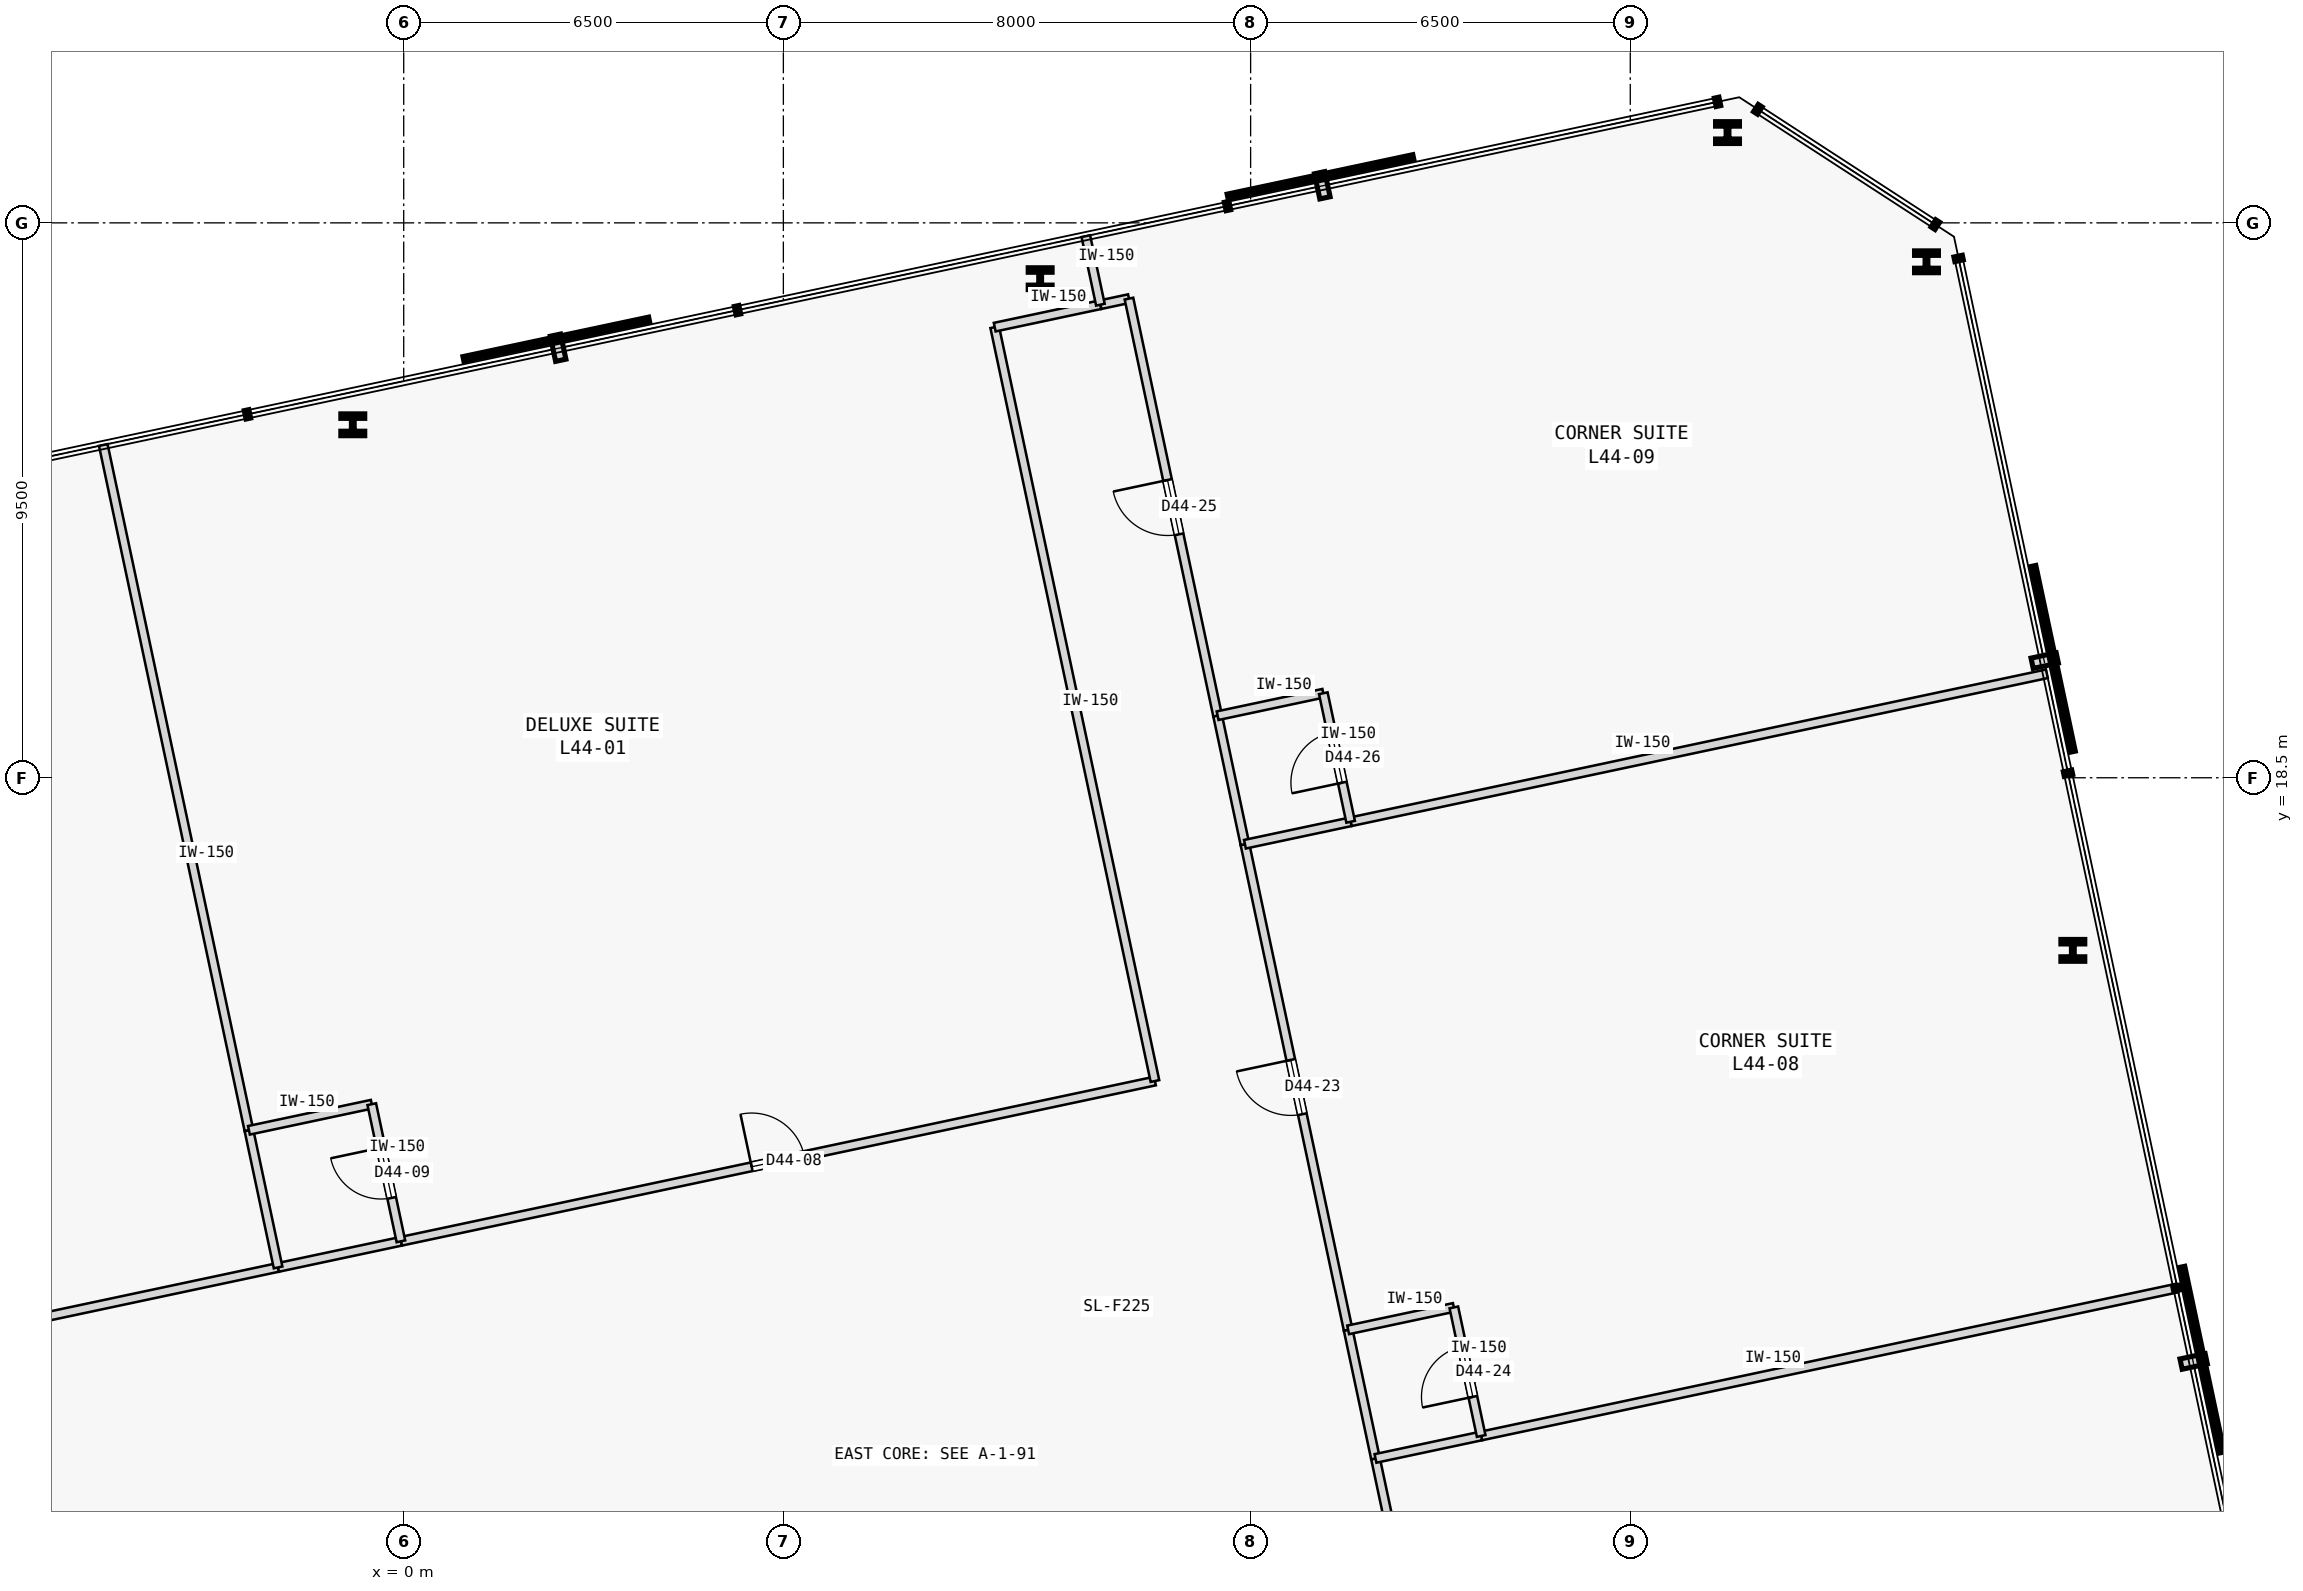
"""IFC4 building model, lengths in metres.
Left out: names, types, materials, properties, quantities, classifications, styles, units other than length and angle.
Written with IfcOpenShell. Run it as: python <this file> out.ifc"""

import sys

from ifc_helpers import new_model, si_unit, direction, frame, frame_2d, origin, origin_2d, place, context, subcontext, project, spatial, rectangle, i_section, extrude, element, fill, save


model = new_model("IFC4")
c1 = context("Model", 3, precision=1e-05, world=origin(), true_north=direction((0.0, 1.0)))
c2 = subcontext(c1, "Body", "Model", "MODEL_VIEW")
j1 = project(units=[si_unit("LENGTHUNIT", "METRE"), si_unit("PLANEANGLEUNIT", "RADIAN")], contexts=[c1])
p1 = place(None, origin())
s1 = spatial("IfcSite", under=j1, at=p1, CompositionType="ELEMENT")
p2 = place(p1, origin())
s2 = spatial("IfcBuilding", under=s1, at=p2, CompositionType="ELEMENT")
p3 = place(p2, frame((0.0, 0.0, 171.8)))
s3 = spatial("IfcBuildingStorey", under=s2, at=p3, CompositionType="ELEMENT", Elevation=171.8)
for number, where, z_axis, x_axis in (
    (1, (28.577, 15.545, 0.0), (0.0, 0.0, 1.0), (1.0, 0.0, 0.0)),
    (2, (26.071, 27.333, 0.0), (0.0, 0.0, 1.0), (1.0, 0.0, 0.0)),
    (3, (22.665, 29.546, 0.0), (0.0, 0.0, 1.0), (1.0, 0.0, 0.0)),
    (4, (10.896, 27.044, 0.0), (0.0, 0.0, 1.0), (1.0, 0.0, 0.0)),
    (5, (-0.872, 24.543, 0.0), (0.0, 0.0, 1.0), (1.0, 0.0, 0.0)),
):
    element("IfcColumn", number, at=place(p3, frame(where, z_axis=z_axis, x_axis=x_axis)), inside=s3, PredefinedType="COLUMN", context=c2, shape_type="SweptSolid", body=[
        extrude(i_section(OverallWidth=0.409, OverallDepth=0.374, WebThickness=0.048, FlangeThickness=0.077, FilletRadius=0.015, at=origin_2d()), origin(), (0.0, 0.0, 1.0), 3.4),
    ])
p4 = place(p3, frame((-17.162, 6.926, 0.0), z_axis=(0.0, 0.0, 1.0), x_axis=(0.978145870853, 0.207919829103, 0.0)))
e6 = element("IfcWall", 6, at=p4, inside=s3, PredefinedType="PARTITIONING", context=c2, shape_type="SweptSolid", body=[
    extrude(rectangle(XDim=15.347, YDim=0.15, at=frame_2d((7.673, 0.0))), origin(), (0.0, 0.0, 1.0), 3.175),
])
p5 = place(p4, frame((7.213, 0.0, 0.0)))
e7 = element("IfcOpeningElement", 7, at=p5, cuts=e6, PredefinedType="OPENING", context=c2, shape_type="SweptSolid", body=[
    extrude(rectangle(XDim=0.92, YDim=2.15, at=frame_2d((0.46, 1.075))), frame((0.0, 0.085, 0.0), z_axis=(0.0, -1.0, 0.0), x_axis=(1.0, 0.0, 0.0)), (0.0, 0.0, 1.0), 0.17),
])
p6 = place(p3, frame((-0.048, 10.564, 0.0), z_axis=(0.0, 0.0, 1.0), x_axis=(0.978149729453, 0.207901675731, 0.0)))
e8 = element("IfcWall", 8, at=p6, inside=s3, PredefinedType="PARTITIONING", context=c2, shape_type="SweptSolid", body=[
    extrude(rectangle(XDim=13.198, YDim=0.15, at=frame_2d((6.599, 0.0))), origin(), (0.0, 0.0, 1.0), 3.175),
])
p7 = place(p6, frame((6.139, 0.0, 0.0)))
e9 = element("IfcOpeningElement", 9, at=p7, cuts=e8, PredefinedType="OPENING", context=c2, shape_type="SweptSolid", body=[
    extrude(rectangle(XDim=0.92, YDim=2.15, at=frame_2d((0.46, 1.075))), frame((0.0, 0.085, 0.0), z_axis=(0.0, -1.0, 0.0), x_axis=(1.0, 0.0, 0.0)), (0.0, 0.0, 1.0), 0.17),
])
p8 = place(p3, frame((12.862, 13.308, 0.0), z_axis=(0.0, 0.0, 1.0), x_axis=(-0.207911421929, 0.978147657888, 0.0)))
e10 = element("IfcWall", 10, at=p8, inside=s3, PredefinedType="PARTITIONING", context=c2, shape_type="SweptSolid", body=[
    extrude(rectangle(XDim=13.195, YDim=0.15, at=frame_2d((6.598, 0.0))), origin(), (0.0, 0.0, 1.0), 3.175),
])
p9 = place(p3, frame((10.118, 26.214, 0.0), z_axis=(0.0, 0.0, 1.0), x_axis=(0.978133353907, 0.20797870558, 0.0)))
e11 = element("IfcWall", 11, at=p9, inside=s3, PredefinedType="PARTITIONING", context=c2, shape_type="SweptSolid", body=[
    extrude(rectangle(XDim=1.85, YDim=0.15, at=frame_2d((0.925, 0.0))), origin(), (0.0, 0.0, 1.0), 3.175),
])
p10 = place(p3, frame((-2.151, 10.117, 0.0), z_axis=(0.0, 0.0, 1.0), x_axis=(0.978146728319, 0.207915795165, 0.0)))
e12 = element("IfcWall", 12, at=p10, inside=s3, PredefinedType="PARTITIONING", context=c2, shape_type="SweptSolid", body=[
    extrude(rectangle(XDim=2.15, YDim=0.15, at=frame_2d((1.075, 0.0))), origin(), (0.0, 0.0, 1.0), 3.175),
])
p11 = place(p3, frame((18.405, -1.468, 0.0), z_axis=(0.0, 0.0, 1.0), x_axis=(-0.207888984761, 0.97815242678, 0.0)))
e13 = element("IfcWall", 13, at=p11, inside=s3, PredefinedType="PARTITIONING", context=c2, shape_type="SweptSolid", body=[
    extrude(rectangle(XDim=8.5, YDim=0.15, at=frame_2d((4.25, 0.0))), origin(), (0.0, 0.0, 1.0), 3.175),
])
p12 = place(p11, frame((3.775, 0.0, 0.0)))
e14 = element("IfcOpeningElement", 14, at=p12, cuts=e13, PredefinedType="OPENING", context=c2, shape_type="SweptSolid", body=[
    extrude(rectangle(XDim=0.95, YDim=2.15, at=frame_2d((0.475, 1.075))), frame((0.0, 0.085, 0.0), z_axis=(0.0, -1.0, 0.0), x_axis=(1.0, 0.0, 0.0)), (0.0, 0.0, 1.0), 0.17),
])
p13 = place(p3, frame((16.17, 9.047, 0.0), z_axis=(0.0, 0.0, 1.0), x_axis=(-0.2079164651, 0.978146585917, 0.0)))
e15 = element("IfcWall", 15, at=p13, inside=s3, PredefinedType="PARTITIONING", context=c2, shape_type="SweptSolid", body=[
    extrude(rectangle(XDim=8.5, YDim=0.15, at=frame_2d((4.25, 0.0))), origin(), (0.0, 0.0, 1.0), 3.175),
])
p14 = place(p13, frame((3.775, 0.0, 0.0)))
e16 = element("IfcOpeningElement", 16, at=p14, cuts=e15, PredefinedType="OPENING", context=c2, shape_type="SweptSolid", body=[
    extrude(rectangle(XDim=0.95, YDim=2.15, at=frame_2d((0.475, 1.075))), frame((0.0, 0.085, 0.0), z_axis=(0.0, -1.0, 0.0), x_axis=(1.0, 0.0, 0.0)), (0.0, 0.0, 1.0), 0.17),
])
p15 = place(p3, frame((16.638, 6.847, 0.0), z_axis=(0.0, 0.0, 1.0), x_axis=(-0.207913264065, 0.978147266328, 0.0)))
e17 = element("IfcWall", 17, at=p15, inside=s3, PredefinedType="PARTITIONING", context=c2, shape_type="SweptSolid", body=[
    extrude(rectangle(XDim=2.25, YDim=0.15, at=frame_2d((1.125, 0.0))), origin(), (0.0, 0.0, 1.0), 3.175),
])
p16 = place(p3, frame((11.928, 26.599, 0.0), z_axis=(0.0, 0.0, 1.0), x_axis=(0.97822210712, 0.207560856478, 0.0)))
e18 = element("IfcWall", 18, at=p16, inside=s3, PredefinedType="PARTITIONING", context=c2, shape_type="SweptSolid", body=[
    extrude(rectangle(XDim=0.5, YDim=0.15, at=frame_2d((0.25, 0.0))), origin(), (0.0, 0.0, 1.0), 3.175),
])
p17 = place(p3, frame((13.935, 19.562, 0.0), z_axis=(0.0, 0.0, 1.0), x_axis=(-0.207923154003, 0.978145164088, 0.0)))
e19 = element("IfcWall", 19, at=p17, inside=s3, PredefinedType="PARTITIONING", context=c2, shape_type="SweptSolid", body=[
    extrude(rectangle(XDim=7.3, YDim=0.15, at=frame_2d((3.65, 0.0))), origin(), (0.0, 0.0, 1.0), 3.175),
])
p18 = place(p17, frame((3.175, 0.0, 0.0)))
e20 = element("IfcOpeningElement", 20, at=p18, cuts=e19, PredefinedType="OPENING", context=c2, shape_type="SweptSolid", body=[
    extrude(rectangle(XDim=0.95, YDim=2.15, at=frame_2d((0.475, 1.075))), frame((0.0, 0.085, 0.0), z_axis=(0.0, -1.0, 0.0), x_axis=(1.0, 0.0, 0.0)), (0.0, 0.0, 1.0), 0.17),
])
p19 = place(p3, frame((14.403, 17.362, 0.0), z_axis=(0.0, 0.0, 1.0), x_axis=(-0.207913264065, 0.978147266328, 0.0)))
e21 = element("IfcWall", 21, at=p19, inside=s3, PredefinedType="PARTITIONING", context=c2, shape_type="SweptSolid", body=[
    extrude(rectangle(XDim=2.25, YDim=0.15, at=frame_2d((1.125, 0.0))), origin(), (0.0, 0.0, 1.0), 3.175),
])
p20 = place(p3, frame((-2.65, 12.464, 0.0), z_axis=(0.0, 0.0, 1.0), x_axis=(-0.207914988081, 0.978146899873, 0.0)))
e22 = element("IfcWall", 22, at=p20, inside=s3, PredefinedType="PARTITIONING", context=c2, shape_type="SweptSolid", body=[
    extrude(rectangle(XDim=11.995, YDim=0.15, at=frame_2d((5.998, 0.0))), origin(), (0.0, 0.0, 1.0), 3.175),
])
p21 = place(p3, frame((-2.151, 10.117, 0.0), z_axis=(0.0, 0.0, 1.0), x_axis=(-0.207917150959, 0.978146440129, 0.0)))
e23 = element("IfcWall", 23, at=p21, inside=s3, PredefinedType="PARTITIONING", context=c2, shape_type="SweptSolid", body=[
    extrude(rectangle(XDim=2.4, YDim=0.15, at=frame_2d((1.2, 0.0))), origin(), (0.0, 0.0, 1.0), 3.175),
])
p22 = place(p3, frame((-2.65, 12.464, 0.0), z_axis=(0.0, 0.0, 1.0), x_axis=(0.978146728319, 0.207915795165, 0.0)))
e24 = element("IfcWall", 24, at=p22, inside=s3, PredefinedType="PARTITIONING", context=c2, shape_type="SweptSolid", body=[
    extrude(rectangle(XDim=2.15, YDim=0.15, at=frame_2d((1.075, 0.0))), origin(), (0.0, 0.0, 1.0), 3.175),
])
p23 = place(p3, frame((-0.048, 10.564, 0.0), z_axis=(0.0, 0.0, 1.0), x_axis=(-0.207917150959, 0.978146440129, 0.0)))
e25 = element("IfcWall", 25, at=p23, inside=s3, PredefinedType="PARTITIONING", context=c2, shape_type="SweptSolid", body=[
    extrude(rectangle(XDim=2.4, YDim=0.15, at=frame_2d((1.2, 0.0))), origin(), (0.0, 0.0, 1.0), 3.175),
])
p24 = place(p23, frame((0.76, 0.0, 0.0)))
e26 = element("IfcOpeningElement", 26, at=p24, cuts=e25, PredefinedType="OPENING", context=c2, shape_type="SweptSolid", body=[
    extrude(rectangle(XDim=0.88, YDim=2.15, at=frame_2d((0.44, 1.075))), frame((0.0, 0.085, 0.0), z_axis=(0.0, -1.0, 0.0), x_axis=(1.0, 0.0, 0.0)), (0.0, 0.0, 1.0), 0.17),
])
p25 = place(p3, frame((11.928, 26.599, 0.0), z_axis=(0.0, 0.0, 1.0), x_axis=(-0.20795853359, 0.978137642823, 0.0)))
e27 = element("IfcWall", 27, at=p25, inside=s3, PredefinedType="PARTITIONING", context=c2, shape_type="SweptSolid", body=[
    extrude(rectangle(XDim=1.2, YDim=0.15, at=frame_2d((0.6, 0.0))), origin(), (0.0, 0.0, 1.0), 3.175),
])
p26 = place(p3, frame((18.447, 7.231, 0.0), z_axis=(0.0, 0.0, 1.0), x_axis=(0.978149634612, 0.207902121941, 0.0)))
e28 = element("IfcWall", 28, at=p26, inside=s3, PredefinedType="PARTITIONING", context=c2, shape_type="SweptSolid", body=[
    extrude(rectangle(XDim=12.187, YDim=0.15, at=frame_2d((6.094, 0.0))), origin(), (0.0, 0.0, 1.0), 3.175),
])
p27 = place(p3, frame((16.638, 6.847, 0.0), z_axis=(0.0, 0.0, 1.0), x_axis=(0.978160192495, 0.207852442415, 0.0)))
e29 = element("IfcWall", 29, at=p27, inside=s3, PredefinedType="PARTITIONING", context=c2, shape_type="SweptSolid", body=[
    extrude(rectangle(XDim=1.85, YDim=0.15, at=frame_2d((0.925, 0.0))), origin(), (0.0, 0.0, 1.0), 3.175),
])
p28 = place(p3, frame((16.17, 9.047, 0.0), z_axis=(0.0, 0.0, 1.0), x_axis=(0.978133353907, 0.20797870558, 0.0)))
e30 = element("IfcWall", 30, at=p28, inside=s3, PredefinedType="PARTITIONING", context=c2, shape_type="SweptSolid", body=[
    extrude(rectangle(XDim=1.85, YDim=0.15, at=frame_2d((0.925, 0.0))), origin(), (0.0, 0.0, 1.0), 3.175),
])
p29 = place(p3, frame((18.447, 7.231, 0.0), z_axis=(0.0, 0.0, 1.0), x_axis=(-0.207891197838, 0.978151956427, 0.0)))
e31 = element("IfcWall", 31, at=p29, inside=s3, PredefinedType="PARTITIONING", context=c2, shape_type="SweptSolid", body=[
    extrude(rectangle(XDim=2.25, YDim=0.15, at=frame_2d((1.125, 0.0))), origin(), (0.0, 0.0, 1.0), 3.175),
])
p30 = place(p29, frame((0.685, 0.0, 0.0)))
e32 = element("IfcOpeningElement", 32, at=p30, cuts=e31, PredefinedType="OPENING", context=c2, shape_type="SweptSolid", body=[
    extrude(rectangle(XDim=0.88, YDim=2.15, at=frame_2d((0.44, 1.075))), frame((0.0, 0.085, 0.0), z_axis=(0.0, -1.0, 0.0), x_axis=(1.0, 0.0, 0.0)), (0.0, 0.0, 1.0), 0.17),
])
p31 = place(p3, frame((16.212, 17.746, 0.0), z_axis=(0.0, 0.0, 1.0), x_axis=(0.978149634612, 0.207902121941, 0.0)))
e33 = element("IfcWall", 33, at=p31, inside=s3, PredefinedType="PARTITIONING", context=c2, shape_type="SweptSolid", body=[
    extrude(rectangle(XDim=12.187, YDim=0.15, at=frame_2d((6.094, 0.0))), origin(), (0.0, 0.0, 1.0), 3.175),
])
for number, where, z_axis, x_axis in (
    (34, (14.403, 17.362, 0.0), (0.0, 0.0, 1.0), (0.978, 0.208, 0.0)),
    (35, (13.935, 19.562, 0.0), (0.0, 0.0, 1.0), (0.978, 0.208, 0.0)),
):
    element("IfcWall", number, at=place(p3, frame(where, z_axis=z_axis, x_axis=x_axis)), inside=s3, PredefinedType="PARTITIONING", context=c2, shape_type="SweptSolid", body=[
        extrude(rectangle(XDim=1.85, YDim=0.15, at=frame_2d((0.925, 0.0))), origin(), (0.0, 0.0, 1.0), 3.175),
    ])
p32 = place(p3, frame((16.212, 17.746, 0.0), z_axis=(0.0, 0.0, 1.0), x_axis=(-0.207913264065, 0.978147266328, 0.0)))
e36 = element("IfcWall", 36, at=p32, inside=s3, PredefinedType="PARTITIONING", context=c2, shape_type="SweptSolid", body=[
    extrude(rectangle(XDim=2.25, YDim=0.15, at=frame_2d((1.125, 0.0))), origin(), (0.0, 0.0, 1.0), 3.175),
])
p33 = place(p32, frame((0.685, 0.0, 0.0)))
e37 = element("IfcOpeningElement", 37, at=p33, cuts=e36, PredefinedType="OPENING", context=c2, shape_type="SweptSolid", body=[
    extrude(rectangle(XDim=0.88, YDim=2.15, at=frame_2d((0.44, 1.075))), frame((0.0, 0.085, 0.0), z_axis=(0.0, -1.0, 0.0), x_axis=(1.0, 0.0, 0.0)), (0.0, 0.0, 1.0), 0.17),
])
p34 = place(p7, origin())
e38 = element("IfcDoor", 38, at=p34, inside=s3, OperationType="SINGLE_SWING_LEFT", PredefinedType="DOOR", context=c2, shape_type="SweptSolid", body=[
    extrude(rectangle(XDim=0.92, YDim=2.15, at=frame_2d((0.46, 1.075))), frame((0.0, 0.025, 0.0), z_axis=(0.0, -1.0, 0.0), x_axis=(1.0, 0.0, 0.0)), (0.0, 0.0, 1.0), 0.05),
])
fill(e9, e38)
p35 = place(p24, origin())
e39 = element("IfcDoor", 39, at=p35, inside=s3, OperationType="SINGLE_SWING_RIGHT", PredefinedType="DOOR", context=c2, shape_type="SweptSolid", body=[
    extrude(rectangle(XDim=0.88, YDim=2.15, at=frame_2d((0.44, 1.075))), frame((0.0, 0.025, 0.0), z_axis=(0.0, -1.0, 0.0), x_axis=(1.0, 0.0, 0.0)), (0.0, 0.0, 1.0), 0.05),
])
fill(e26, e39)
p36 = place(p14, origin())
e40 = element("IfcDoor", 40, at=p36, inside=s3, OperationType="SINGLE_SWING_RIGHT", PredefinedType="DOOR", context=c2, shape_type="SweptSolid", body=[
    extrude(rectangle(XDim=0.95, YDim=2.15, at=frame_2d((0.475, 1.075))), frame((0.0, 0.025, 0.0), z_axis=(0.0, -1.0, 0.0), x_axis=(1.0, 0.0, 0.0)), (0.0, 0.0, 1.0), 0.05),
])
fill(e16, e40)
p37 = place(p30, origin())
e41 = element("IfcDoor", 41, at=p37, inside=s3, OperationType="SINGLE_SWING_LEFT", PredefinedType="DOOR", context=c2, shape_type="SweptSolid", body=[
    extrude(rectangle(XDim=0.88, YDim=2.15, at=frame_2d((0.44, 1.075))), frame((0.0, 0.025, 0.0), z_axis=(0.0, -1.0, 0.0), x_axis=(1.0, 0.0, 0.0)), (0.0, 0.0, 1.0), 0.05),
])
fill(e32, e41)
p38 = place(p18, origin())
e42 = element("IfcDoor", 42, at=p38, inside=s3, OperationType="SINGLE_SWING_RIGHT", PredefinedType="DOOR", context=c2, shape_type="SweptSolid", body=[
    extrude(rectangle(XDim=0.95, YDim=2.15, at=frame_2d((0.475, 1.075))), frame((0.0, 0.025, 0.0), z_axis=(0.0, -1.0, 0.0), x_axis=(1.0, 0.0, 0.0)), (0.0, 0.0, 1.0), 0.05),
])
fill(e20, e42)
p39 = place(p33, origin())
e43 = element("IfcDoor", 43, at=p39, inside=s3, OperationType="SINGLE_SWING_LEFT", PredefinedType="DOOR", context=c2, shape_type="SweptSolid", body=[
    extrude(rectangle(XDim=0.88, YDim=2.15, at=frame_2d((0.44, 1.075))), frame((0.0, 0.025, 0.0), z_axis=(0.0, -1.0, 0.0), x_axis=(1.0, 0.0, 0.0)), (0.0, 0.0, 1.0), 0.05),
])
fill(e37, e43)
save(model, sys.argv[1])
